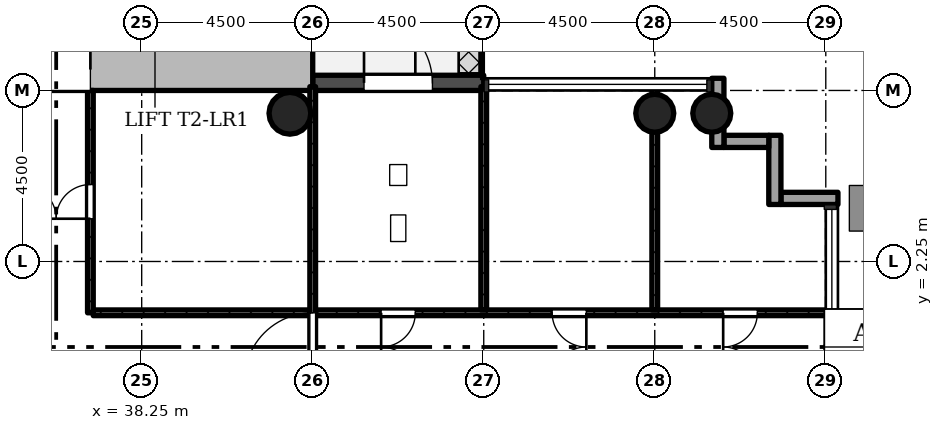
"""IFC4 building model, lengths in metres.
Left out: names, types, materials, properties, quantities, classifications, styles, units other than length and angle.
Written with IfcOpenShell. Run it as: python <this file> out.ifc"""

import sys

from ifc_helpers import new_model, si_unit, direction, frame, frame_2d, origin, origin_2d, place, context, subcontext, project, spatial, rectangle, hollow_circle, extrude, element, fill, save


model = new_model("IFC4")
c1 = context("Model", 3, precision=1e-05, world=origin(), true_north=direction((0.0, 1.0)))
c2 = subcontext(c1, "Body", "Model", "MODEL_VIEW")
j1 = project(units=[si_unit("LENGTHUNIT", "METRE"), si_unit("PLANEANGLEUNIT", "RADIAN")], contexts=[c1])
p1 = place(None, origin())
s1 = spatial("IfcSite", under=j1, at=p1, CompositionType="ELEMENT")
p2 = place(p1, origin())
s2 = spatial("IfcBuilding", under=s1, at=p2, CompositionType="ELEMENT")
p3 = place(p2, frame((0.0, 0.0, 72.1)))
s3 = spatial("IfcBuildingStorey", under=s2, at=p3, CompositionType="ELEMENT", Elevation=72.1)
p4 = place(p3, frame((30.35, 7.3, 0.0), z_axis=(0.0, 0.0, 1.0), x_axis=(1.0, 0.0, 0.0)))
e1 = element("IfcWall", 1, at=p4, inside=s3, PredefinedType="SHEAR", context=c2, shape_type="SweptSolid", body=[
    extrude(rectangle(XDim=12.4, YDim=1.1, at=frame_2d((6.2, 0.0))), origin(), (0.0, 0.0, 1.0), 4.5),
])
p5 = place(p4, frame((4.75, 0.0, 0.0)))
e2 = element("IfcOpeningElement", 2, at=p5, cuts=e1, PredefinedType="OPENING", context=c2, shape_type="SweptSolid", body=[
    extrude(rectangle(XDim=1.8, YDim=2.1, at=frame_2d((0.9, 1.05))), frame((0.0, 0.56, 0.0), z_axis=(0.0, -1.0, 0.0), x_axis=(1.0, 0.0, 0.0)), (0.0, 0.0, 1.0), 1.12),
])
for number, where, z_axis, x_axis in (
    (3, (51.75, 6.15, 0.0), (0.0, 0.0, 1.0), (1.0, 0.0, 0.0)),
    (4, (53.25, 6.15, 0.0), (0.0, 0.0, 1.0), (1.0, 0.0, 0.0)),
):
    element("IfcColumn", number, at=place(p3, frame(where, z_axis=z_axis, x_axis=x_axis)), inside=s3, PredefinedType="COLUMN", context=c2, shape_type="SweptSolid", body=[
        extrude(hollow_circle(Radius=0.5, WallThickness=0.036, at=origin_2d()), origin(), (0.0, 0.0, 1.0), 4.5),
    ])
p6 = place(p3, frame((42.15, 6.15, 0.0), z_axis=(0.0, 0.0, 1.0), x_axis=(1.0, 0.0, 0.0)))
e5 = element("IfcColumn", 5, at=p6, inside=s3, PredefinedType="COLUMN", context=c2, shape_type="SweptSolid", body=[
    extrude(hollow_circle(Radius=0.55, WallThickness=0.04, at=origin_2d()), origin(), (0.0, 0.0, 1.0), 4.5),
])
p7 = place(p3, frame((56.57, 3.91, -0.3), z_axis=(0.0, 0.0, 1.0), x_axis=(-1.0, 0.0, 0.0)))
e6 = element("IfcWall", 6, at=p7, inside=s3, PredefinedType="STANDARD", context=c2, shape_type="SweptSolid", body=[
    extrude(rectangle(XDim=1.5, YDim=0.32, at=frame_2d((0.75, 0.0))), origin(), (0.0, 0.0, 1.0), 4.5),
])
p8 = place(p3, frame((54.91, 3.75, -0.3), z_axis=(0.0, 0.0, 1.0), x_axis=(0.0, 1.0, 0.0)))
e7 = element("IfcWall", 7, at=p8, inside=s3, PredefinedType="STANDARD", context=c2, shape_type="SweptSolid", body=[
    extrude(rectangle(XDim=1.82, YDim=0.32, at=frame_2d((0.91, 0.0))), origin(), (0.0, 0.0, 1.0), 4.5),
])
p9 = place(p3, frame((54.75, 5.41, -0.3), z_axis=(0.0, 0.0, 1.0), x_axis=(-1.0, 0.0, 0.0)))
e8 = element("IfcWall", 8, at=p9, inside=s3, PredefinedType="STANDARD", context=c2, shape_type="SweptSolid", body=[
    extrude(rectangle(XDim=1.18, YDim=0.32, at=frame_2d((0.59, 0.0))), origin(), (0.0, 0.0, 1.0), 4.5),
])
p10 = place(p3, frame((53.41, 5.25, -0.3), z_axis=(0.0, 0.0, 1.0), x_axis=(0.0, 1.0, 0.0)))
e9 = element("IfcWall", 9, at=p10, inside=s3, PredefinedType="STANDARD", context=c2, shape_type="SweptSolid", body=[
    extrude(rectangle(XDim=1.82, YDim=0.32, at=frame_2d((0.91, 0.0))), origin(), (0.0, 0.0, 1.0), 4.5),
])
p11 = place(p3, frame((47.25, 6.95, -0.02), z_axis=(0.0, 0.0, 1.0), x_axis=(-1.0, 0.0, 0.0)))
e10 = element("IfcWall", 10, at=p11, inside=s3, PredefinedType="STANDARD", context=c2, shape_type="SweptSolid", body=[
    extrude(rectangle(XDim=4.5, YDim=0.4, at=frame_2d((2.25, 0.0))), origin(), (0.0, 0.0, 1.0), 4.22),
])
p12 = place(p11, frame((1.35, 0.0, 0.02)))
e11 = element("IfcOpeningElement", 11, at=p12, cuts=e10, PredefinedType="OPENING", context=c2, shape_type="SweptSolid", body=[
    extrude(rectangle(XDim=1.8, YDim=2.1, at=frame_2d((0.9, 1.05))), frame((0.0, 0.21, 0.0), z_axis=(0.0, -1.0, 0.0), x_axis=(1.0, 0.0, 0.0)), (0.0, 0.0, 1.0), 0.42),
])
p13 = place(p3, frame((36.9, 0.9, 0.0), z_axis=(0.0, 0.0, 1.0), x_axis=(0.0, 1.0, 0.0)))
e12 = element("IfcWall", 12, at=p13, inside=s3, PredefinedType="PARTITIONING", context=c2, shape_type="SweptSolid", body=[
    extrude(rectangle(XDim=5.85, YDim=0.15, at=frame_2d((2.925, 0.0))), origin(), (0.0, 0.0, 1.0), 4.08),
])
p14 = place(p13, frame((2.475, 0.0, 0.0)))
e13 = element("IfcOpeningElement", 13, at=p14, cuts=e12, PredefinedType="OPENING", context=c2, shape_type="SweptSolid", body=[
    extrude(rectangle(XDim=0.9, YDim=2.1, at=frame_2d((0.45, 1.05))), frame((0.0, 0.085, 0.0), z_axis=(0.0, -1.0, 0.0), x_axis=(1.0, 0.0, 0.0)), (0.0, 0.0, 1.0), 0.17),
])
p15 = place(p3, frame((42.675, 0.9, 0.0), z_axis=(0.0, 0.0, 1.0), x_axis=(-1.0, 0.0, 0.0)))
e14 = element("IfcWall", 14, at=p15, inside=s3, PredefinedType="PARTITIONING", context=c2, shape_type="SweptSolid", body=[
    extrude(rectangle(XDim=5.7, YDim=0.15, at=frame_2d((2.85, 0.0))), origin(), (0.0, 0.0, 1.0), 4.08),
])
p16 = place(p3, frame((42.75, -6.85, 0.0), z_axis=(0.0, 0.0, 1.0), x_axis=(0.0, 1.0, 0.0)))
e15 = element("IfcWall", 15, at=p16, inside=s3, PredefinedType="PARTITIONING", context=c2, shape_type="SweptSolid", body=[
    extrude(rectangle(XDim=13.7, YDim=0.15, at=frame_2d((6.85, 0.0))), origin(), (0.0, 0.0, 1.0), 4.08),
])
p17 = place(p16, frame((5.95, 0.0, 0.0)))
e16 = element("IfcOpeningElement", 16, at=p17, cuts=e15, PredefinedType="OPENING", context=c2, shape_type="SweptSolid", body=[
    extrude(rectangle(XDim=1.8, YDim=2.1, at=frame_2d((0.9, 1.05))), frame((0.0, 0.085, 0.0), z_axis=(0.0, -1.0, 0.0), x_axis=(1.0, 0.0, 0.0)), (0.0, 0.0, 1.0), 0.17),
])
p18 = place(p3, frame((56.35, 0.9, 0.0), z_axis=(0.0, 0.0, 1.0), x_axis=(-1.0, 0.0, 0.0)))
e17 = element("IfcWall", 17, at=p18, inside=s3, PredefinedType="PARTITIONING", context=c2, shape_type="SweptSolid", body=[
    extrude(rectangle(XDim=13.525, YDim=0.15, at=frame_2d((6.763, 0.0))), origin(), (0.0, 0.0, 1.0), 4.08),
])
p19 = place(p18, frame((1.9, 0.0, 0.0)))
e18 = element("IfcOpeningElement", 18, at=p19, cuts=e17, PredefinedType="OPENING", context=c2, shape_type="SweptSolid", body=[
    extrude(rectangle(XDim=0.9, YDim=2.1, at=frame_2d((0.45, 1.05))), frame((0.0, 0.085, 0.0), z_axis=(0.0, -1.0, 0.0), x_axis=(1.0, 0.0, 0.0)), (0.0, 0.0, 1.0), 0.17),
])
p20 = place(p18, frame((6.4, 0.0, 0.0)))
e19 = element("IfcOpeningElement", 19, at=p20, cuts=e17, PredefinedType="OPENING", context=c2, shape_type="SweptSolid", body=[
    extrude(rectangle(XDim=0.9, YDim=2.1, at=frame_2d((0.45, 1.05))), frame((0.0, 0.085, 0.0), z_axis=(0.0, -1.0, 0.0), x_axis=(1.0, 0.0, 0.0)), (0.0, 0.0, 1.0), 0.17),
])
p21 = place(p18, frame((10.9, 0.0, 0.0)))
e20 = element("IfcOpeningElement", 20, at=p21, cuts=e17, PredefinedType="OPENING", context=c2, shape_type="SweptSolid", body=[
    extrude(rectangle(XDim=0.9, YDim=2.1, at=frame_2d((0.45, 1.05))), frame((0.0, 0.085, 0.0), z_axis=(0.0, -1.0, 0.0), x_axis=(1.0, 0.0, 0.0)), (0.0, 0.0, 1.0), 0.17),
])
for number, where, z_axis, x_axis in (
    (21, (51.75, 0.975, 0.0), (0.0, 0.0, 1.0), (0.0, 1.0, 0.0)),
    (22, (47.25, 0.975, 0.0), (0.0, 0.0, 1.0), (0.0, 1.0, 0.0)),
):
    element("IfcWall", number, at=place(p3, frame(where, z_axis=z_axis, x_axis=x_axis)), inside=s3, PredefinedType="PARTITIONING", context=c2, shape_type="SweptSolid", body=[
        extrude(rectangle(XDim=5.875, YDim=0.15, at=frame_2d((2.938, 0.0))), origin(), (0.0, 0.0, 1.0), 4.08),
    ])
p22 = place(p12, origin())
e23 = element("IfcDoor", 23, at=p22, inside=s3, OperationType="SINGLE_SWING_RIGHT", PredefinedType="DOOR", context=c2, shape_type="SweptSolid", body=[
    extrude(rectangle(XDim=1.8, YDim=2.1, at=frame_2d((0.9, 1.05))), frame((0.0, 0.025, 0.0), z_axis=(0.0, -1.0, 0.0), x_axis=(1.0, 0.0, 0.0)), (0.0, 0.0, 1.0), 0.05),
])
fill(e11, e23)
p23 = place(p14, origin())
e24 = element("IfcDoor", 24, at=p23, inside=s3, OperationType="SINGLE_SWING_RIGHT", PredefinedType="DOOR", context=c2, shape_type="SweptSolid", body=[
    extrude(rectangle(XDim=0.9, YDim=2.1, at=frame_2d((0.45, 1.05))), frame((0.0, 0.025, 0.0), z_axis=(0.0, -1.0, 0.0), x_axis=(1.0, 0.0, 0.0)), (0.0, 0.0, 1.0), 0.05),
])
fill(e13, e24)
p24 = place(p17, origin())
e25 = element("IfcDoor", 25, at=p24, inside=s3, OperationType="SINGLE_SWING_RIGHT", PredefinedType="DOOR", context=c2, shape_type="SweptSolid", body=[
    extrude(rectangle(XDim=1.8, YDim=2.1, at=frame_2d((0.9, 1.05))), frame((0.0, 0.025, 0.0), z_axis=(0.0, -1.0, 0.0), x_axis=(1.0, 0.0, 0.0)), (0.0, 0.0, 1.0), 0.05),
])
fill(e16, e25)
p25 = place(p19, origin())
e26 = element("IfcDoor", 26, at=p25, inside=s3, OperationType="SINGLE_SWING_LEFT", PredefinedType="DOOR", context=c2, shape_type="SweptSolid", body=[
    extrude(rectangle(XDim=0.9, YDim=2.1, at=frame_2d((0.45, 1.05))), frame((0.0, 0.025, 0.0), z_axis=(0.0, -1.0, 0.0), x_axis=(1.0, 0.0, 0.0)), (0.0, 0.0, 1.0), 0.05),
])
fill(e18, e26)
p26 = place(p20, origin())
e27 = element("IfcDoor", 27, at=p26, inside=s3, OperationType="SINGLE_SWING_RIGHT", PredefinedType="DOOR", context=c2, shape_type="SweptSolid", body=[
    extrude(rectangle(XDim=0.9, YDim=2.1, at=frame_2d((0.45, 1.05))), frame((0.0, 0.025, 0.0), z_axis=(0.0, -1.0, 0.0), x_axis=(1.0, 0.0, 0.0)), (0.0, 0.0, 1.0), 0.05),
])
fill(e19, e27)
p27 = place(p21, origin())
e28 = element("IfcDoor", 28, at=p27, inside=s3, OperationType="SINGLE_SWING_LEFT", PredefinedType="DOOR", context=c2, shape_type="SweptSolid", body=[
    extrude(rectangle(XDim=0.9, YDim=2.1, at=frame_2d((0.45, 1.05))), frame((0.0, 0.025, 0.0), z_axis=(0.0, -1.0, 0.0), x_axis=(1.0, 0.0, 0.0)), (0.0, 0.0, 1.0), 0.05),
])
fill(e20, e28)
p28 = place(p5, origin())
e29 = element("IfcDoor", 29, at=p28, inside=s3, OperationType="SINGLE_SWING_LEFT", PredefinedType="DOOR", context=c2, shape_type="SweptSolid", body=[
    extrude(rectangle(XDim=1.8, YDim=2.1, at=frame_2d((0.9, 1.05))), frame((0.0, 0.025, 0.0), z_axis=(0.0, -1.0, 0.0), x_axis=(1.0, 0.0, 0.0)), (0.0, 0.0, 1.0), 0.05),
])
fill(e2, e29)
save(model, sys.argv[1])
